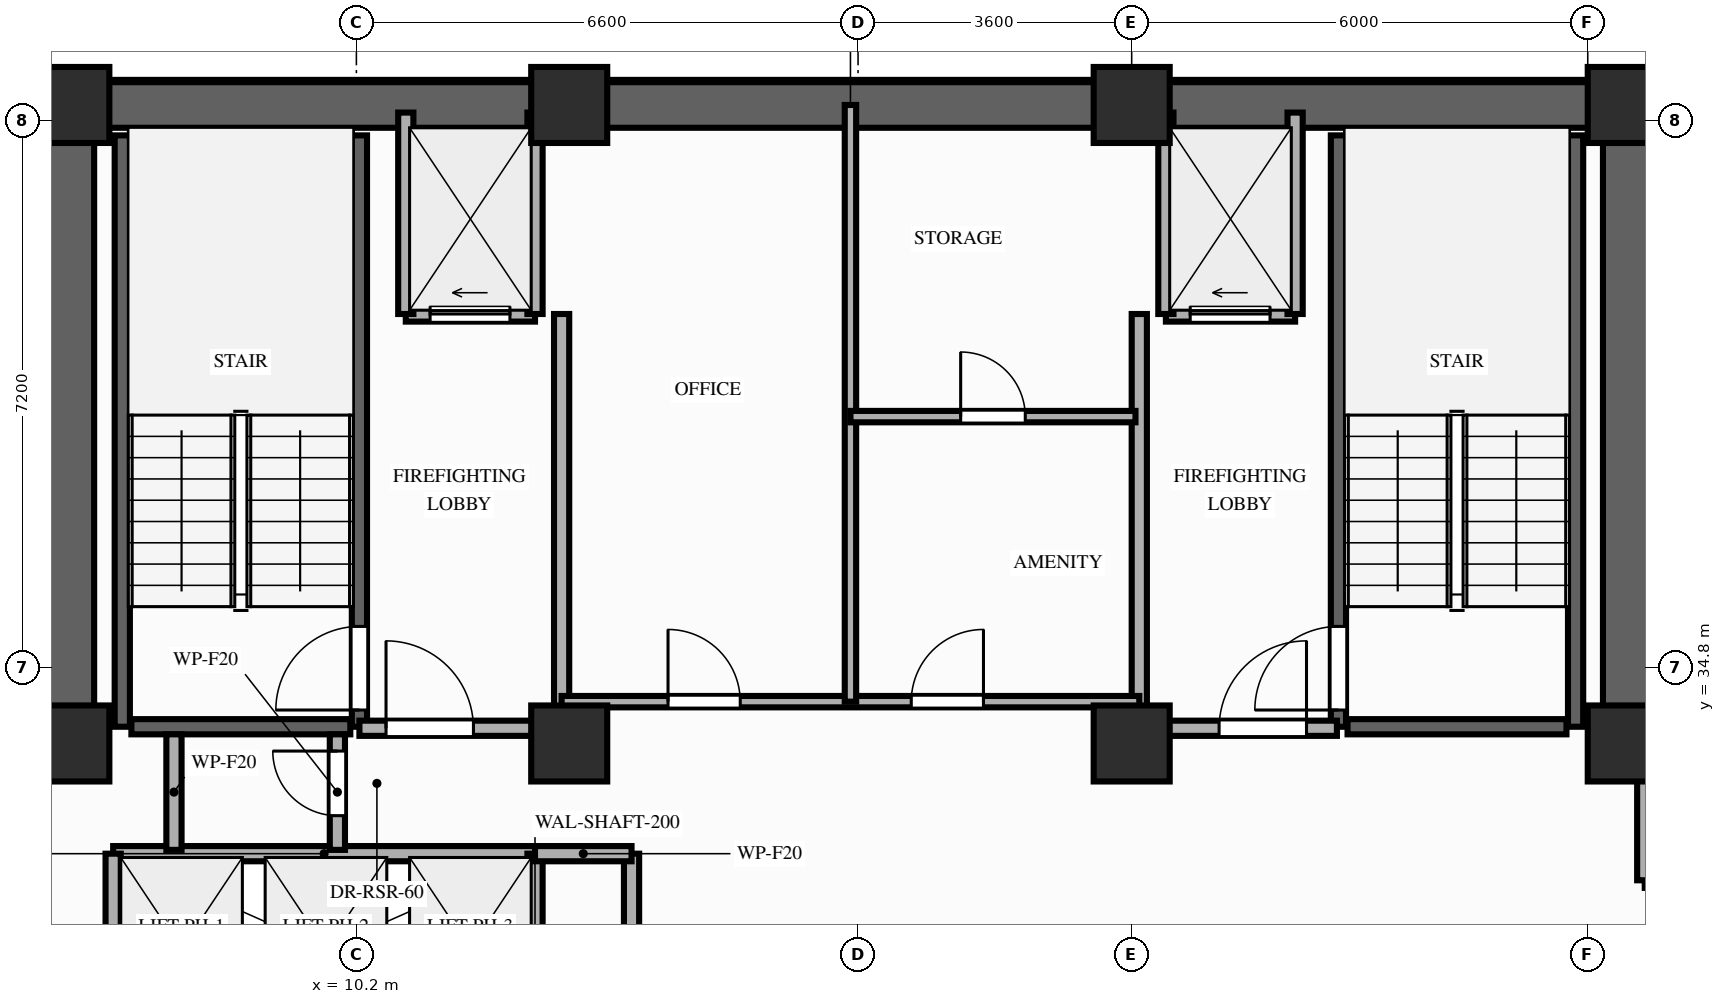
"""IFC4 building model, lengths in metres.
Left out: names, types, materials, properties, quantities, classifications, styles, units other than length and angle.
Written with IfcOpenShell. Run it as: python <this file> out.ifc"""

import sys

from ifc_helpers import new_model, si_unit, direction, frame, frame_2d, origin, origin_2d, place, context, subcontext, project, spatial, rectangle, extrude, element, fill, save


model = new_model("IFC4")
c1 = context("Model", 3, precision=1e-05, world=origin(), true_north=direction((0.0, 1.0)))
c2 = subcontext(c1, "Body", "Model", "MODEL_VIEW")
j1 = project(units=[si_unit("LENGTHUNIT", "METRE"), si_unit("PLANEANGLEUNIT", "RADIAN")], contexts=[c1])
p1 = place(None, origin())
s1 = spatial("IfcSite", under=j1, at=p1, CompositionType="ELEMENT")
p2 = place(p1, origin())
s2 = spatial("IfcBuilding", under=s1, at=p2, CompositionType="ELEMENT")
p3 = place(p2, frame((0.0, 0.0, 169.6)))
s3 = spatial("IfcBuildingStorey", under=s2, at=p3, CompositionType="ELEMENT", Elevation=169.6)
for number, where, z_axis, x_axis in (
    (1, (6.45, 33.8, 0.0), (0.0, 0.0, 1.0), (1.0, 0.0, 0.0)),
    (2, (13.0, 33.8, 0.0), (0.0, 0.0, 1.0), (1.0, 0.0, 0.0)),
    (3, (20.4, 33.8, 0.0), (0.0, 0.0, 1.0), (1.0, 0.0, 0.0)),
    (4, (26.9, 33.8, 0.0), (0.0, 0.0, 1.0), (1.0, 0.0, 0.0)),
    (5, (6.45, 42.2, 0.0), (0.0, 0.0, 1.0), (1.0, 0.0, 0.0)),
    (6, (13.0, 42.2, 0.0), (0.0, 0.0, 1.0), (1.0, 0.0, 0.0)),
    (7, (20.4, 42.2, 0.0), (0.0, 0.0, 1.0), (1.0, 0.0, 0.0)),
    (8, (26.9, 42.2, 0.0), (0.0, 0.0, 1.0), (1.0, 0.0, 0.0)),
):
    element("IfcColumn", number, at=place(p3, frame(where, z_axis=z_axis, x_axis=x_axis)), inside=s3, PredefinedType="COLUMN", context=c2, shape_type="SweptSolid", body=[
        extrude(rectangle(XDim=1.0, YDim=1.0, at=origin_2d()), origin(), (0.0, 0.0, 1.0), 3.2),
    ])
p4 = place(p3, frame((6.45, 42.2, 0.0), z_axis=(0.0, 0.0, 1.0), x_axis=(1.0, 0.0, 0.0)))
e9 = element("IfcWall", 9, at=p4, inside=s3, PredefinedType="SHEAR", context=c2, shape_type="SweptSolid", body=[
    extrude(rectangle(XDim=20.45, YDim=0.6, at=frame_2d((10.225, 0.0))), origin(), (0.0, 0.0, 1.0), 3.02),
])
for number, where, z_axis, x_axis in (
    (10, (6.45, 33.8, 0.0), (0.0, 0.0, 1.0), (0.0, 1.0, 0.0)),
    (11, (26.9, 33.8, 0.0), (0.0, 0.0, 1.0), (0.0, 1.0, 0.0)),
):
    element("IfcWall", number, at=place(p3, frame(where, z_axis=z_axis, x_axis=x_axis)), inside=s3, PredefinedType="SHEAR", context=c2, shape_type="SweptSolid", body=[
        extrude(rectangle(XDim=7.95, YDim=0.6, at=frame_2d((3.975, 0.0))), origin(), (0.0, 0.0, 1.0), 3.02),
    ])
p5 = place(p3, frame((7.12, 34.02, 0.0), z_axis=(0.0, 0.0, 1.0), x_axis=(0.0, 1.0, 0.0)))
e12 = element("IfcWall", 12, at=p5, inside=s3, PredefinedType="SHEAR", context=c2, shape_type="SweptSolid", body=[
    extrude(rectangle(XDim=7.78, YDim=0.2, at=frame_2d((3.89, 0.0))), origin(), (0.0, 0.0, 1.0), 3.02),
])
p6 = place(p3, frame((10.24, 34.02, 0.0), z_axis=(0.0, 0.0, 1.0), x_axis=(0.0, 1.0, 0.0)))
e13 = element("IfcWall", 13, at=p6, inside=s3, PredefinedType="SHEAR", context=c2, shape_type="SweptSolid", body=[
    extrude(rectangle(XDim=7.78, YDim=0.2, at=frame_2d((3.89, 0.0))), origin(), (0.0, 0.0, 1.0), 3.02),
])
p7 = place(p6, frame((0.22, 0.0, 0.0)))
e14 = element("IfcOpeningElement", 14, at=p7, cuts=e13, PredefinedType="OPENING", context=c2, shape_type="SweptSolid", body=[
    extrude(rectangle(XDim=1.1, YDim=2.15, at=frame_2d((0.55, 1.075))), frame((0.0, 0.11, 0.0), z_axis=(0.0, -1.0, 0.0), x_axis=(1.0, 0.0, 0.0)), (0.0, 0.0, 1.0), 0.22),
])
p8 = place(p3, frame((7.24, 34.02, 0.0), z_axis=(0.0, 0.0, 1.0), x_axis=(1.0, 0.0, 0.0)))
e15 = element("IfcWall", 15, at=p8, inside=s3, PredefinedType="SHEAR", context=c2, shape_type="SweptSolid", body=[
    extrude(rectangle(XDim=2.88, YDim=0.2, at=frame_2d((1.44, 0.0))), origin(), (0.0, 0.0, 1.0), 3.02),
])
p9 = place(p3, frame((23.12, 34.02, 0.0), z_axis=(0.0, 0.0, 1.0), x_axis=(0.0, 1.0, 0.0)))
e16 = element("IfcWall", 16, at=p9, inside=s3, PredefinedType="SHEAR", context=c2, shape_type="SweptSolid", body=[
    extrude(rectangle(XDim=7.78, YDim=0.2, at=frame_2d((3.89, 0.0))), origin(), (0.0, 0.0, 1.0), 3.02),
])
p10 = place(p9, frame((0.22, 0.0, 0.0)))
e17 = element("IfcOpeningElement", 17, at=p10, cuts=e16, PredefinedType="OPENING", context=c2, shape_type="SweptSolid", body=[
    extrude(rectangle(XDim=1.1, YDim=2.15, at=frame_2d((0.55, 1.075))), frame((0.0, 0.11, 0.0), z_axis=(0.0, -1.0, 0.0), x_axis=(1.0, 0.0, 0.0)), (0.0, 0.0, 1.0), 0.22),
])
p11 = place(p3, frame((26.24, 34.02, 0.0), z_axis=(0.0, 0.0, 1.0), x_axis=(0.0, 1.0, 0.0)))
e18 = element("IfcWall", 18, at=p11, inside=s3, PredefinedType="SHEAR", context=c2, shape_type="SweptSolid", body=[
    extrude(rectangle(XDim=7.78, YDim=0.2, at=frame_2d((3.89, 0.0))), origin(), (0.0, 0.0, 1.0), 3.02),
])
p12 = place(p3, frame((23.24, 34.02, 0.0), z_axis=(0.0, 0.0, 1.0), x_axis=(1.0, 0.0, 0.0)))
e19 = element("IfcWall", 19, at=p12, inside=s3, PredefinedType="SHEAR", context=c2, shape_type="SweptSolid", body=[
    extrude(rectangle(XDim=2.88, YDim=0.2, at=frame_2d((1.44, 0.0))), origin(), (0.0, 0.0, 1.0), 3.02),
])
p13 = place(p3, frame((7.0, 32.35, 0.0), z_axis=(0.0, 0.0, 1.0), x_axis=(1.0, 0.0, 0.0)))
e20 = element("IfcWall", 20, at=p13, inside=s3, PredefinedType="MOVABLE", context=c2, shape_type="SweptSolid", body=[
    extrude(rectangle(XDim=5.55, YDim=0.2, at=frame_2d((2.775, 0.0))), origin(), (0.0, 0.0, 1.0), 3.02),
])
for number, where, z_axis, x_axis in (
    (21, (7.0, 29.85, 0.0), (0.0, 0.0, 1.0), (0.0, 1.0, 0.0)),
    (22, (12.55, 29.85, 0.0), (0.0, 0.0, 1.0), (0.0, 1.0, 0.0)),
):
    element("IfcWall", number, at=place(p3, frame(where, z_axis=z_axis, x_axis=x_axis)), inside=s3, PredefinedType="MOVABLE", context=c2, shape_type="SweptSolid", body=[
        extrude(rectangle(XDim=2.5, YDim=0.2, at=frame_2d((1.25, 0.0))), origin(), (0.0, 0.0, 1.0), 3.02),
    ])
p14 = place(p3, frame((10.85, 39.45, 0.0), z_axis=(0.0, 0.0, 1.0), x_axis=(1.0, 0.0, 0.0)))
e23 = element("IfcWall", 23, at=p14, inside=s3, PredefinedType="MOVABLE", context=c2, shape_type="SweptSolid", body=[
    extrude(rectangle(XDim=1.7, YDim=0.2, at=frame_2d((0.85, 0.0))), origin(), (0.0, 0.0, 1.0), 3.02),
])
p15 = place(p14, frame((0.32, 0.0, 0.0)))
e24 = element("IfcOpeningElement", 24, at=p15, cuts=e23, PredefinedType="OPENING", context=c2, shape_type="SweptSolid", body=[
    extrude(rectangle(XDim=1.05, YDim=2.15, at=frame_2d((0.525, 1.075))), frame((0.0, 0.11, 0.0), z_axis=(0.0, -1.0, 0.0), x_axis=(1.0, 0.0, 0.0)), (0.0, 0.0, 1.0), 0.22),
])
p16 = place(p3, frame((20.85, 39.45, 0.0), z_axis=(0.0, 0.0, 1.0), x_axis=(1.0, 0.0, 0.0)))
e25 = element("IfcWall", 25, at=p16, inside=s3, PredefinedType="MOVABLE", context=c2, shape_type="SweptSolid", body=[
    extrude(rectangle(XDim=1.7, YDim=0.2, at=frame_2d((0.85, 0.0))), origin(), (0.0, 0.0, 1.0), 3.02),
])
p17 = place(p16, frame((0.32, 0.0, 0.0)))
e26 = element("IfcOpeningElement", 26, at=p17, cuts=e25, PredefinedType="OPENING", context=c2, shape_type="SweptSolid", body=[
    extrude(rectangle(XDim=1.05, YDim=2.15, at=frame_2d((0.525, 1.075))), frame((0.0, 0.11, 0.0), z_axis=(0.0, -1.0, 0.0), x_axis=(1.0, 0.0, 0.0)), (0.0, 0.0, 1.0), 0.22),
])
for number, where, z_axis, x_axis in (
    (27, (10.85, 39.45, 0.0), (0.0, 0.0, 1.0), (0.0, 1.0, 0.0)),
    (28, (12.55, 39.45, 0.0), (0.0, 0.0, 1.0), (0.0, 1.0, 0.0)),
):
    element("IfcWall", number, at=place(p3, frame(where, z_axis=z_axis, x_axis=x_axis)), inside=s3, PredefinedType="MOVABLE", context=c2, shape_type="SweptSolid", body=[
        extrude(rectangle(XDim=2.65, YDim=0.2, at=frame_2d((1.325, 0.0))), origin(), (0.0, 0.0, 1.0), 2.45),
    ])
p18 = place(p3, frame((12.9, 34.0, 0.0), z_axis=(0.0, 0.0, 1.0), x_axis=(0.0, 1.0, 0.0)))
e29 = element("IfcWall", 29, at=p18, inside=s3, PredefinedType="PARTITIONING", context=c2, shape_type="SweptSolid", body=[
    extrude(rectangle(XDim=5.45, YDim=0.2, at=frame_2d((2.725, 0.0))), origin(), (0.0, 0.0, 1.0), 2.45),
])
p19 = place(p3, frame((10.24, 34.0, 0.0), z_axis=(0.0, 0.0, 1.0), x_axis=(1.0, 0.0, 0.0)))
e30 = element("IfcWall", 30, at=p19, inside=s3, PredefinedType="PARTITIONING", context=c2, shape_type="SweptSolid", body=[
    extrude(rectangle(XDim=2.66, YDim=0.2, at=frame_2d((1.33, 0.0))), origin(), (0.0, 0.0, 1.0), 2.45),
])
p20 = place(p19, frame((0.35, 0.0, 0.0)))
e31 = element("IfcOpeningElement", 31, at=p20, cuts=e30, PredefinedType="OPENING", context=c2, shape_type="SweptSolid", body=[
    extrude(rectangle(XDim=1.15, YDim=2.15, at=frame_2d((0.575, 1.075))), frame((0.0, 0.11, 0.0), z_axis=(0.0, -1.0, 0.0), x_axis=(1.0, 0.0, 0.0)), (0.0, 0.0, 1.0), 0.22),
])
for number, where, z_axis, x_axis in (
    (32, (20.85, 39.45, 0.0), (0.0, 0.0, 1.0), (0.0, 1.0, 0.0)),
    (33, (22.55, 39.45, 0.0), (0.0, 0.0, 1.0), (0.0, 1.0, 0.0)),
):
    element("IfcWall", number, at=place(p3, frame(where, z_axis=z_axis, x_axis=x_axis)), inside=s3, PredefinedType="MOVABLE", context=c2, shape_type="SweptSolid", body=[
        extrude(rectangle(XDim=2.65, YDim=0.2, at=frame_2d((1.325, 0.0))), origin(), (0.0, 0.0, 1.0), 2.45),
    ])
p21 = place(p3, frame((20.5, 34.0, 0.0), z_axis=(0.0, 0.0, 1.0), x_axis=(0.0, 1.0, 0.0)))
e34 = element("IfcWall", 34, at=p21, inside=s3, PredefinedType="PARTITIONING", context=c2, shape_type="SweptSolid", body=[
    extrude(rectangle(XDim=5.45, YDim=0.2, at=frame_2d((2.725, 0.0))), origin(), (0.0, 0.0, 1.0), 2.45),
])
p22 = place(p3, frame((20.5, 34.0, 0.0), z_axis=(0.0, 0.0, 1.0), x_axis=(1.0, 0.0, 0.0)))
e35 = element("IfcWall", 35, at=p22, inside=s3, PredefinedType="PARTITIONING", context=c2, shape_type="SweptSolid", body=[
    extrude(rectangle(XDim=2.6, YDim=0.2, at=frame_2d((1.3, 0.0))), origin(), (0.0, 0.0, 1.0), 2.45),
])
p23 = place(p22, frame((1.05, 0.0, 0.0)))
e36 = element("IfcOpeningElement", 36, at=p23, cuts=e35, PredefinedType="OPENING", context=c2, shape_type="SweptSolid", body=[
    extrude(rectangle(XDim=1.15, YDim=2.15, at=frame_2d((0.575, 1.075))), frame((0.0, 0.11, 0.0), z_axis=(0.0, -1.0, 0.0), x_axis=(1.0, 0.0, 0.0)), (0.0, 0.0, 1.0), 0.22),
])
p24 = place(p3, frame((13.82, 29.85, 0.0), z_axis=(0.0, 0.0, 1.0), x_axis=(0.0, 1.0, 0.0)))
e37 = element("IfcWall", 37, at=p24, inside=s3, PredefinedType="PARTITIONING", context=c2, shape_type="SweptSolid", body=[
    extrude(rectangle(XDim=2.5, YDim=0.2, at=frame_2d((1.25, 0.0))), origin(), (0.0, 0.0, 1.0), 3.02),
])
p25 = place(p3, frame((12.55, 32.35, 0.0), z_axis=(0.0, 0.0, 1.0), x_axis=(1.0, 0.0, 0.0)))
e38 = element("IfcWall", 38, at=p25, inside=s3, PredefinedType="PARTITIONING", context=c2, shape_type="SweptSolid", body=[
    extrude(rectangle(XDim=1.27, YDim=0.2, at=frame_2d((0.635, 0.0))), origin(), (0.0, 0.0, 1.0), 3.02),
])
p26 = place(p3, frame((7.8, 32.4, 0.0), z_axis=(0.0, 0.0, 1.0), x_axis=(0.0, 1.0, 0.0)))
e39 = element("IfcWall", 39, at=p26, inside=s3, PredefinedType="PARTITIONING", context=c2, shape_type="SweptSolid", body=[
    extrude(rectangle(XDim=1.52, YDim=0.2, at=frame_2d((0.76, 0.0))), origin(), (0.0, 0.0, 1.0), 2.45),
])
p27 = place(p3, frame((9.95, 32.4, 0.0), z_axis=(0.0, 0.0, 1.0), x_axis=(0.0, 1.0, 0.0)))
e40 = element("IfcWall", 40, at=p27, inside=s3, PredefinedType="PARTITIONING", context=c2, shape_type="SweptSolid", body=[
    extrude(rectangle(XDim=1.52, YDim=0.2, at=frame_2d((0.76, 0.0))), origin(), (0.0, 0.0, 1.0), 2.45),
])
p28 = place(p27, frame((0.45, 0.0, 0.0)))
e41 = element("IfcOpeningElement", 41, at=p28, cuts=e40, PredefinedType="OPENING", context=c2, shape_type="SweptSolid", body=[
    extrude(rectangle(XDim=0.85, YDim=2.05, at=frame_2d((0.425, 1.025))), frame((0.0, 0.11, 0.0), z_axis=(0.0, -1.0, 0.0), x_axis=(1.0, 0.0, 0.0)), (0.0, 0.0, 1.0), 0.22),
])
p29 = place(p3, frame((12.9, 34.35, 0.0), z_axis=(0.0, 0.0, 1.0), x_axis=(1.0, 0.0, 0.0)))
e42 = element("IfcWall", 42, at=p29, inside=s3, PredefinedType="PARTITIONING", context=c2, shape_type="SweptSolid", body=[
    extrude(rectangle(XDim=7.6, YDim=0.15, at=frame_2d((3.8, 0.0))), origin(), (0.0, 0.0, 1.0), 3.02),
])
p30 = place(p29, frame((1.4, 0.0, 0.0)))
e43 = element("IfcOpeningElement", 43, at=p30, cuts=e42, PredefinedType="OPENING", context=c2, shape_type="SweptSolid", body=[
    extrude(rectangle(XDim=0.95, YDim=2.15, at=frame_2d((0.475, 1.075))), frame((0.0, 0.085, 0.0), z_axis=(0.0, -1.0, 0.0), x_axis=(1.0, 0.0, 0.0)), (0.0, 0.0, 1.0), 0.17),
])
p31 = place(p29, frame((4.6, 0.0, 0.0)))
e44 = element("IfcOpeningElement", 44, at=p31, cuts=e42, PredefinedType="OPENING", context=c2, shape_type="SweptSolid", body=[
    extrude(rectangle(XDim=0.95, YDim=2.15, at=frame_2d((0.475, 1.075))), frame((0.0, 0.085, 0.0), z_axis=(0.0, -1.0, 0.0), x_axis=(1.0, 0.0, 0.0)), (0.0, 0.0, 1.0), 0.17),
])
p32 = place(p3, frame((16.7, 34.35, 0.0), z_axis=(0.0, 0.0, 1.0), x_axis=(0.0, 1.0, 0.0)))
e45 = element("IfcWall", 45, at=p32, inside=s3, PredefinedType="PARTITIONING", context=c2, shape_type="SweptSolid", body=[
    extrude(rectangle(XDim=7.85, YDim=0.15, at=frame_2d((3.925, 0.0))), origin(), (0.0, 0.0, 1.0), 2.45),
])
p33 = place(p3, frame((16.7, 38.1, 0.0), z_axis=(0.0, 0.0, 1.0), x_axis=(1.0, 0.0, 0.0)))
e46 = element("IfcWall", 46, at=p33, inside=s3, PredefinedType="PARTITIONING", context=c2, shape_type="SweptSolid", body=[
    extrude(rectangle(XDim=3.75, YDim=0.15, at=frame_2d((1.875, 0.0))), origin(), (0.0, 0.0, 1.0), 3.02),
])
p34 = place(p33, frame((1.45, 0.0, 0.0)))
e47 = element("IfcOpeningElement", 47, at=p34, cuts=e46, PredefinedType="OPENING", context=c2, shape_type="SweptSolid", body=[
    extrude(rectangle(XDim=0.85, YDim=2.05, at=frame_2d((0.425, 1.025))), frame((0.0, 0.085, 0.0), z_axis=(0.0, -1.0, 0.0), x_axis=(1.0, 0.0, 0.0)), (0.0, 0.0, 1.0), 0.17),
])
p35 = place(p3, frame((27.15, 32.0, 0.0), z_axis=(0.0, 0.0, 1.0), x_axis=(1.0, 0.0, 0.0)))
e48 = element("IfcWall", 48, at=p35, inside=s3, PredefinedType="PARTITIONING", context=c2, shape_type="SweptSolid", body=[
    extrude(rectangle(XDim=9.45, YDim=0.2, at=frame_2d((4.725, 0.0))), origin(), (0.0, 0.0, 1.0), 2.45),
])
p36 = place(p35, frame((4.25, 0.0, 0.0)))
e49 = element("IfcOpeningElement", 49, at=p36, cuts=e48, PredefinedType="OPENING", context=c2, shape_type="SweptSolid", body=[
    extrude(rectangle(XDim=0.95, YDim=2.15, at=frame_2d((0.475, 1.075))), frame((0.0, 0.11, 0.0), z_axis=(0.0, -1.0, 0.0), x_axis=(1.0, 0.0, 0.0)), (0.0, 0.0, 1.0), 0.22),
])
p37 = place(p3, frame((27.15, 32.0, 0.0), z_axis=(0.0, 0.0, 1.0), x_axis=(0.0, 1.0, 0.0)))
e50 = element("IfcWall", 50, at=p37, inside=s3, PredefinedType="PARTITIONING", context=c2, shape_type="SweptSolid", body=[
    extrude(rectangle(XDim=1.68, YDim=0.2, at=frame_2d((0.84, 0.0))), origin(), (0.0, 0.0, 1.0), 2.45),
])
p38 = place(p7, origin())
e51 = element("IfcDoor", 51, at=p38, inside=s3, OperationType="SINGLE_SWING_LEFT", PredefinedType="DOOR", context=c2, shape_type="SweptSolid", body=[
    extrude(rectangle(XDim=1.1, YDim=2.15, at=frame_2d((0.55, 1.075))), frame((0.0, 0.025, 0.0), z_axis=(0.0, -1.0, 0.0), x_axis=(1.0, 0.0, 0.0)), (0.0, 0.0, 1.0), 0.05),
])
fill(e14, e51)
p39 = place(p10, origin())
e52 = element("IfcDoor", 52, at=p39, inside=s3, OperationType="SINGLE_SWING_LEFT", PredefinedType="DOOR", context=c2, shape_type="SweptSolid", body=[
    extrude(rectangle(XDim=1.1, YDim=2.15, at=frame_2d((0.55, 1.075))), frame((0.0, 0.025, 0.0), z_axis=(0.0, -1.0, 0.0), x_axis=(1.0, 0.0, 0.0)), (0.0, 0.0, 1.0), 0.05),
])
fill(e17, e52)
p40 = place(p15, origin())
e53 = element("IfcDoor", 53, at=p40, inside=s3, OperationType="SLIDING_TO_LEFT", PredefinedType="DOOR", context=c2, shape_type="SweptSolid", body=[
    extrude(rectangle(XDim=1.05, YDim=2.15, at=frame_2d((0.525, 1.075))), frame((0.0, 0.025, 0.0), z_axis=(0.0, -1.0, 0.0), x_axis=(1.0, 0.0, 0.0)), (0.0, 0.0, 1.0), 0.05),
])
fill(e24, e53)
p41 = place(p17, origin())
e54 = element("IfcDoor", 54, at=p41, inside=s3, OperationType="SLIDING_TO_LEFT", PredefinedType="DOOR", context=c2, shape_type="SweptSolid", body=[
    extrude(rectangle(XDim=1.05, YDim=2.15, at=frame_2d((0.525, 1.075))), frame((0.0, 0.025, 0.0), z_axis=(0.0, -1.0, 0.0), x_axis=(1.0, 0.0, 0.0)), (0.0, 0.0, 1.0), 0.05),
])
fill(e26, e54)
p42 = place(p20, origin())
e55 = element("IfcDoor", 55, at=p42, inside=s3, OperationType="SINGLE_SWING_LEFT", PredefinedType="DOOR", context=c2, shape_type="SweptSolid", body=[
    extrude(rectangle(XDim=1.15, YDim=2.15, at=frame_2d((0.575, 1.075))), frame((0.0, 0.025, 0.0), z_axis=(0.0, -1.0, 0.0), x_axis=(1.0, 0.0, 0.0)), (0.0, 0.0, 1.0), 0.05),
])
fill(e31, e55)
p43 = place(p23, origin())
e56 = element("IfcDoor", 56, at=p43, inside=s3, OperationType="SINGLE_SWING_RIGHT", PredefinedType="DOOR", context=c2, shape_type="SweptSolid", body=[
    extrude(rectangle(XDim=1.15, YDim=2.15, at=frame_2d((0.575, 1.075))), frame((0.0, 0.025, 0.0), z_axis=(0.0, -1.0, 0.0), x_axis=(1.0, 0.0, 0.0)), (0.0, 0.0, 1.0), 0.05),
])
fill(e36, e56)
p44 = place(p28, origin())
e57 = element("IfcDoor", 57, at=p44, inside=s3, OperationType="SINGLE_SWING_RIGHT", PredefinedType="DOOR", context=c2, shape_type="SweptSolid", body=[
    extrude(rectangle(XDim=0.85, YDim=2.05, at=frame_2d((0.425, 1.025))), frame((0.0, 0.025, 0.0), z_axis=(0.0, -1.0, 0.0), x_axis=(1.0, 0.0, 0.0)), (0.0, 0.0, 1.0), 0.05),
])
fill(e41, e57)
p45 = place(p30, origin())
e58 = element("IfcDoor", 58, at=p45, inside=s3, OperationType="SINGLE_SWING_LEFT", PredefinedType="DOOR", context=c2, shape_type="SweptSolid", body=[
    extrude(rectangle(XDim=0.95, YDim=2.15, at=frame_2d((0.475, 1.075))), frame((0.0, 0.025, 0.0), z_axis=(0.0, -1.0, 0.0), x_axis=(1.0, 0.0, 0.0)), (0.0, 0.0, 1.0), 0.05),
])
fill(e43, e58)
p46 = place(p31, origin())
e59 = element("IfcDoor", 59, at=p46, inside=s3, OperationType="SINGLE_SWING_RIGHT", PredefinedType="DOOR", context=c2, shape_type="SweptSolid", body=[
    extrude(rectangle(XDim=0.95, YDim=2.15, at=frame_2d((0.475, 1.075))), frame((0.0, 0.025, 0.0), z_axis=(0.0, -1.0, 0.0), x_axis=(1.0, 0.0, 0.0)), (0.0, 0.0, 1.0), 0.05),
])
fill(e44, e59)
p47 = place(p34, origin())
e60 = element("IfcDoor", 60, at=p47, inside=s3, OperationType="SINGLE_SWING_LEFT", PredefinedType="DOOR", context=c2, shape_type="SweptSolid", body=[
    extrude(rectangle(XDim=0.85, YDim=2.05, at=frame_2d((0.425, 1.025))), frame((0.0, 0.025, 0.0), z_axis=(0.0, -1.0, 0.0), x_axis=(1.0, 0.0, 0.0)), (0.0, 0.0, 1.0), 0.05),
])
fill(e47, e60)
save(model, sys.argv[1])
